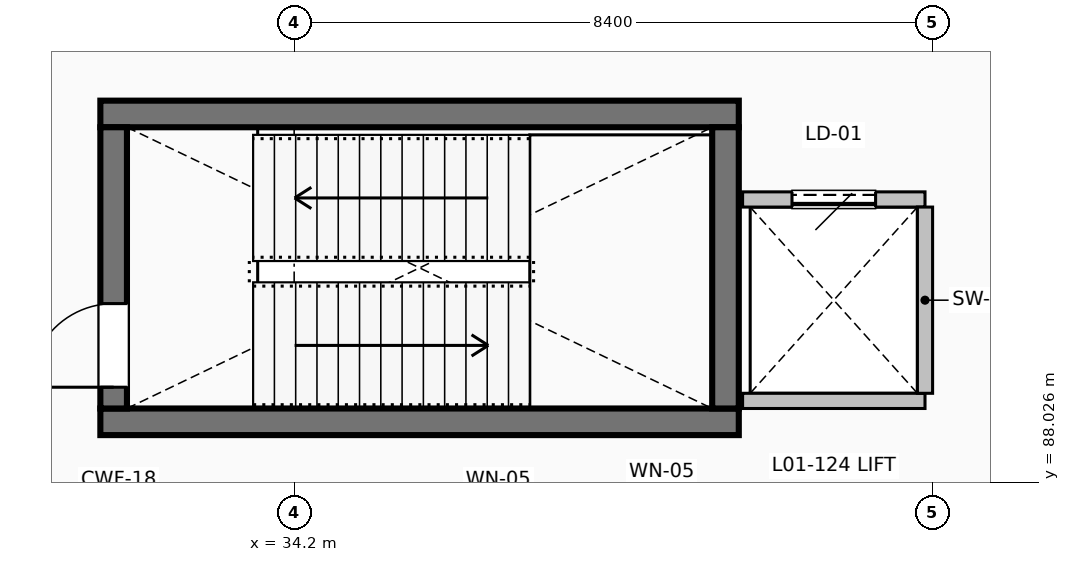
"""IFC4 building model, lengths in metres.
Left out: names, types, materials, properties, quantities, classifications, styles, units other than length and angle.
Written with IfcOpenShell. Run it as: python <this file> out.ifc"""

import sys

from ifc_helpers import new_model, si_unit, direction, frame, frame_2d, origin, place, context, subcontext, project, spatial, rectangle, extrude, element, fill, save


model = new_model("IFC4")
c1 = context("Model", 3, precision=1e-05, world=origin(), true_north=direction((0.0, 1.0)))
c2 = subcontext(c1, "Body", "Model", "MODEL_VIEW")
j1 = project(units=[si_unit("LENGTHUNIT", "METRE"), si_unit("PLANEANGLEUNIT", "RADIAN")], contexts=[c1])
p1 = place(None, origin())
s1 = spatial("IfcSite", under=j1, at=p1, CompositionType="ELEMENT")
p2 = place(p1, origin())
s2 = spatial("IfcBuilding", under=s1, at=p2, CompositionType="ELEMENT")
p3 = place(p2, frame((0.0, 0.0, 5.4)))
s3 = spatial("IfcBuildingStorey", under=s2, at=p3, CompositionType="ELEMENT", Elevation=5.4)
for number, where, z_axis, x_axis in (
    (1, (31.65, 88.825, 0.0), (0.0, 0.0, 1.0), (1.0, 0.0, 0.0)),
    (2, (40.05, 92.875, 0.0), (0.0, 0.0, 1.0), (-1.0, 0.0, 0.0)),
):
    element("IfcWall", number, at=place(p3, frame(where, z_axis=z_axis, x_axis=x_axis)), inside=s3, PredefinedType="SHEAR", context=c2, shape_type="SweptSolid", body=[
        extrude(rectangle(XDim=8.4, YDim=0.35, at=frame_2d((4.2, 0.0))), origin(), (0.0, 0.0, 1.0), 4.5),
    ])
p4 = place(p3, frame((31.825, 89.0, 0.0), z_axis=(0.0, 0.0, 1.0), x_axis=(0.0, 1.0, 0.0)))
e3 = element("IfcWall", 3, at=p4, inside=s3, PredefinedType="SHEAR", context=c2, shape_type="SweptSolid", body=[
    extrude(rectangle(XDim=3.7, YDim=0.35, at=frame_2d((1.85, 0.0))), origin(), (0.0, 0.0, 1.0), 4.5),
])
p5 = place(p4, frame((0.28, 0.0, 0.0)))
e4 = element("IfcOpeningElement", 4, at=p5, cuts=e3, PredefinedType="OPENING", context=c2, shape_type="SweptSolid", body=[
    extrude(rectangle(XDim=1.1, YDim=2.08, at=frame_2d((0.55, 1.04))), frame((0.0, 0.185, 0.0), z_axis=(0.0, -1.0, 0.0), x_axis=(1.0, 0.0, 0.0)), (0.0, 0.0, 1.0), 0.37),
])
p6 = place(p3, frame((39.875, 92.7, 0.0), z_axis=(0.0, 0.0, 1.0), x_axis=(0.0, -1.0, 0.0)))
e5 = element("IfcWall", 5, at=p6, inside=s3, PredefinedType="SHEAR", context=c2, shape_type="SweptSolid", body=[
    extrude(rectangle(XDim=3.7, YDim=0.35, at=frame_2d((1.85, 0.0))), origin(), (0.0, 0.0, 1.0), 4.5),
])
p7 = place(p3, frame((40.1, 89.1, 0.0), z_axis=(0.0, 0.0, 1.0), x_axis=(1.0, 0.0, 0.0)))
e6 = element("IfcWall", 6, at=p7, inside=s3, PredefinedType="PARTITIONING", context=c2, shape_type="SweptSolid", body=[
    extrude(rectangle(XDim=2.4, YDim=0.2, at=frame_2d((1.2, 0.0))), origin(), (0.0, 0.0, 1.0), 4.492),
])
p8 = place(p3, frame((42.5, 91.75, 0.0), z_axis=(0.0, 0.0, 1.0), x_axis=(-1.0, 0.0, 0.0)))
e7 = element("IfcWall", 7, at=p8, inside=s3, PredefinedType="PARTITIONING", context=c2, shape_type="SweptSolid", body=[
    extrude(rectangle(XDim=2.4, YDim=0.2, at=frame_2d((1.2, 0.0))), origin(), (0.0, 0.0, 1.0), 4.492),
])
p9 = place(p8, frame((0.65, 0.0, 0.0)))
e8 = element("IfcOpeningElement", 8, at=p9, cuts=e7, PredefinedType="OPENING", context=c2, shape_type="SweptSolid", body=[
    extrude(rectangle(XDim=1.1, YDim=2.15, at=frame_2d((0.55, 1.075))), frame((0.0, 0.11, 0.0), z_axis=(0.0, -1.0, 0.0), x_axis=(1.0, 0.0, 0.0)), (0.0, 0.0, 1.0), 0.22),
])
p10 = place(p3, frame((42.5, 91.65, 0.0), z_axis=(0.0, 0.0, 1.0), x_axis=(0.0, -1.0, 0.0)))
e9 = element("IfcWall", 9, at=p10, inside=s3, PredefinedType="PARTITIONING", context=c2, shape_type="SweptSolid", body=[
    extrude(rectangle(XDim=2.45, YDim=0.2, at=frame_2d((1.225, 0.0))), origin(), (0.0, 0.0, 1.0), 3.592),
])
p11 = place(p5, origin())
e10 = element("IfcDoor", 10, at=p11, inside=s3, OperationType="SINGLE_SWING_LEFT", PredefinedType="DOOR", context=c2, shape_type="SweptSolid", body=[
    extrude(rectangle(XDim=1.1, YDim=2.08, at=frame_2d((0.55, 1.04))), frame((0.0, 0.025, 0.0), z_axis=(0.0, -1.0, 0.0), x_axis=(1.0, 0.0, 0.0)), (0.0, 0.0, 1.0), 0.05),
])
fill(e4, e10)
p12 = place(p9, origin())
e11 = element("IfcDoor", 11, at=p12, inside=s3, OperationType="SLIDING_TO_LEFT", PredefinedType="DOOR", context=c2, shape_type="SweptSolid", body=[
    extrude(rectangle(XDim=1.1, YDim=2.15, at=frame_2d((0.55, 1.075))), frame((0.0, 0.025, 0.0), z_axis=(0.0, -1.0, 0.0), x_axis=(1.0, 0.0, 0.0)), (0.0, 0.0, 1.0), 0.05),
])
fill(e8, e11)
save(model, sys.argv[1])
